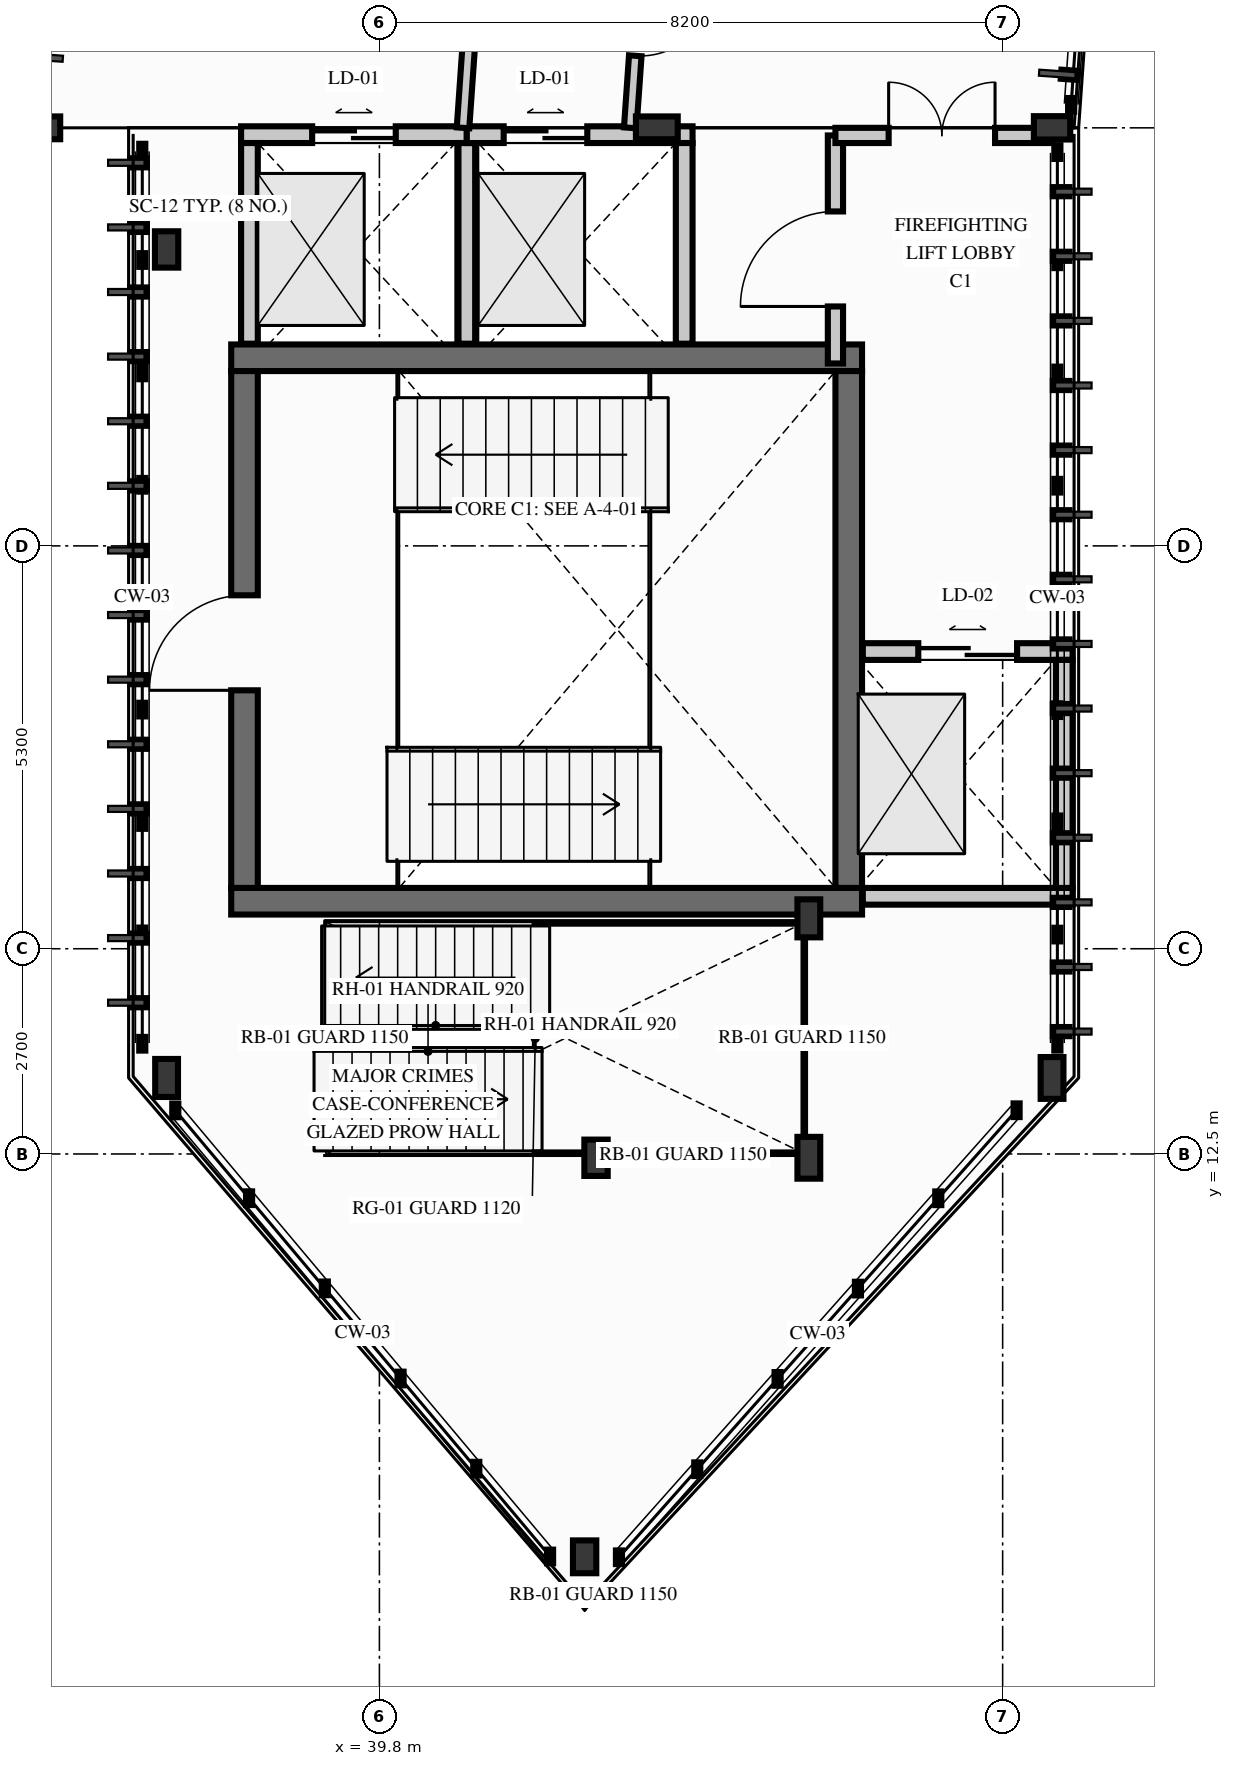
"""IFC4 building model, lengths in metres.
Left out: names, types, materials, properties, quantities, classifications, styles, units other than length and angle.
Written with IfcOpenShell. Run it as: python <this file> out.ifc"""

import sys

from ifc_helpers import new_model, si_unit, direction, frame, frame_2d, origin, origin_2d, place, context, subcontext, project, spatial, rectangle, i_section, extrude, element, fill, save


model = new_model("IFC4")
c1 = context("Model", 3, precision=1e-05, world=origin(), true_north=direction((0.0, 1.0)))
c2 = subcontext(c1, "Body", "Model", "MODEL_VIEW")
j1 = project(units=[si_unit("LENGTHUNIT", "METRE"), si_unit("PLANEANGLEUNIT", "RADIAN")], contexts=[c1])
p1 = place(None, origin())
s1 = spatial("IfcSite", under=j1, at=p1, CompositionType="ELEMENT")
p2 = place(p1, origin())
s2 = spatial("IfcBuilding", under=s1, at=p2, CompositionType="ELEMENT")
p3 = place(p2, frame((0.0, 0.0, 9.3)))
s3 = spatial("IfcBuildingStorey", under=s2, at=p3, CompositionType="ELEMENT", Elevation=9.3)
for number, where, z_axis, x_axis in (
    (1, (37.85, 15.825, 0.0), (0.0, 0.0, 1.0), (1.0, 0.0, 0.0)),
    (2, (37.85, 22.975, 0.0), (0.0, 0.0, 1.0), (1.0, 0.0, 0.0)),
):
    element("IfcWall", number, at=place(p3, frame(where, z_axis=z_axis, x_axis=x_axis)), inside=s3, PredefinedType="SHEAR", context=c2, shape_type="SweptSolid", body=[
        extrude(rectangle(XDim=8.3, YDim=0.35, at=frame_2d((4.15, 0.0))), origin(), (0.0, 0.0, 1.0), 4.0),
    ])
p4 = place(p3, frame((38.025, 16.0, 0.0), z_axis=(0.0, 0.0, 1.0), x_axis=(0.0, 1.0, 0.0)))
e3 = element("IfcWall", 3, at=p4, inside=s3, PredefinedType="SHEAR", context=c2, shape_type="SweptSolid", body=[
    extrude(rectangle(XDim=6.8, YDim=0.35, at=frame_2d((3.4, 0.0))), origin(), (0.0, 0.0, 1.0), 4.0),
])
p5 = place(p4, frame((2.6, 0.0, 0.0)))
e4 = element("IfcOpeningElement", 4, at=p5, cuts=e3, PredefinedType="OPENING", context=c2, shape_type="SweptSolid", body=[
    extrude(rectangle(XDim=1.25, YDim=2.2, at=frame_2d((0.625, 1.1))), frame((0.0, 0.185, 0.0), z_axis=(0.0, -1.0, 0.0), x_axis=(1.0, 0.0, 0.0)), (0.0, 0.0, 1.0), 0.37),
])
p6 = place(p3, frame((45.975, 16.0, 0.0), z_axis=(0.0, 0.0, 1.0), x_axis=(0.0, 1.0, 0.0)))
e5 = element("IfcWall", 5, at=p6, inside=s3, PredefinedType="SHEAR", context=c2, shape_type="SweptSolid", body=[
    extrude(rectangle(XDim=6.8, YDim=0.35, at=frame_2d((3.4, 0.0))), origin(), (0.0, 0.0, 1.0), 4.0),
])
p7 = place(p3, frame((48.65, 26.0, 0.0), z_axis=(0.0, 0.0, 1.0), x_axis=(0.0, 1.0, 0.0)))
e6 = element("IfcColumn", 6, at=p7, inside=s3, PredefinedType="COLUMN", context=c2, shape_type="SweptSolid", body=[
    extrude(i_section(OverallWidth=0.307, OverallDepth=0.478, WebThickness=0.021, FlangeThickness=0.04, FilletRadius=0.027, at=origin_2d()), origin(), (0.0, 0.0, 1.0), 4.2),
])
p8 = place(p3, frame((43.45, 26.0, 0.0), z_axis=(0.0, 0.0, 1.0), x_axis=(0.0, 1.0, 0.0)))
e7 = element("IfcColumn", 7, at=p8, inside=s3, PredefinedType="COLUMN", context=c2, shape_type="SweptSolid", body=[
    extrude(i_section(OverallWidth=0.3, OverallDepth=0.55, WebThickness=0.015, FlangeThickness=0.029, FilletRadius=0.027, at=origin_2d()), origin(), (0.0, 0.0, 1.0), 4.2),
])
p9 = place(p3, frame((35.35, 26.0, 0.0), z_axis=(0.0, 0.0, 1.0), x_axis=(0.0, 1.0, 0.0)))
e8 = element("IfcColumn", 8, at=p9, inside=s3, PredefinedType="COLUMN", context=c2, shape_type="SweptSolid", body=[
    extrude(i_section(OverallWidth=0.3, OverallDepth=0.5, WebThickness=0.014, FlangeThickness=0.028, FilletRadius=0.027, at=origin_2d()), origin(), (0.0, 0.0, 1.0), 4.2),
])
p10 = place(p3, frame((37.0, 24.4, 0.0), z_axis=(0.0, 0.0, 1.0), x_axis=(1.0, 0.0, 0.0)))
e9 = element("IfcColumn", 9, at=p10, inside=s3, PredefinedType="COLUMN", context=c2, shape_type="SweptSolid", body=[
    extrude(i_section(OverallWidth=0.307, OverallDepth=0.478, WebThickness=0.021, FlangeThickness=0.04, FilletRadius=0.027, at=origin_2d()), origin(), (0.0, 0.0, 1.0), 4.2),
])
p11 = place(p3, frame((48.65, 13.5, 0.0), z_axis=(0.0, 0.0, 1.0), x_axis=(1.0, 0.0, 0.0)))
e10 = element("IfcColumn", 10, at=p11, inside=s3, PredefinedType="COLUMN", context=c2, shape_type="SweptSolid", body=[
    extrude(i_section(OverallWidth=0.3, OverallDepth=0.55, WebThickness=0.015, FlangeThickness=0.029, FilletRadius=0.027, at=origin_2d()), origin(), (0.0, 0.0, 1.0), 4.2),
])
p12 = place(p3, frame((37.0, 13.5, 0.0), z_axis=(0.0, 0.0, 1.0), x_axis=(1.0, 0.0, 0.0)))
e11 = element("IfcColumn", 11, at=p12, inside=s3, PredefinedType="COLUMN", context=c2, shape_type="SweptSolid", body=[
    extrude(i_section(OverallWidth=0.3, OverallDepth=0.5, WebThickness=0.014, FlangeThickness=0.028, FilletRadius=0.027, at=origin_2d()), origin(), (0.0, 0.0, 1.0), 4.2),
])
p13 = place(p3, frame((42.5, 7.2, 0.0), z_axis=(0.0, 0.0, 1.0), x_axis=(1.0, 0.0, 0.0)))
e12 = element("IfcColumn", 12, at=p13, inside=s3, PredefinedType="COLUMN", context=c2, shape_type="SweptSolid", body=[
    extrude(i_section(OverallWidth=0.307, OverallDepth=0.432, WebThickness=0.021, FlangeThickness=0.04, FilletRadius=0.027, at=origin_2d()), origin(), (0.0, 0.0, 1.0), 4.2),
])
p14 = place(p3, frame((42.65, 12.45, 0.0), z_axis=(0.0, 0.0, 1.0), x_axis=(1.0, 0.0, 0.0)))
e13 = element("IfcColumn", 13, at=p14, inside=s3, PredefinedType="COLUMN", context=c2, shape_type="SweptSolid", body=[
    extrude(i_section(OverallWidth=0.307, OverallDepth=0.478, WebThickness=0.021, FlangeThickness=0.04, FilletRadius=0.027, at=origin_2d()), origin(), (0.0, 0.0, 1.0), 4.2),
])
p15 = place(p3, frame((45.45, 12.45, 0.0), z_axis=(0.0, 0.0, 1.0), x_axis=(1.0, 0.0, 0.0)))
e14 = element("IfcColumn", 14, at=p15, inside=s3, PredefinedType="COLUMN", context=c2, shape_type="SweptSolid", body=[
    extrude(i_section(OverallWidth=0.3, OverallDepth=0.55, WebThickness=0.015, FlangeThickness=0.029, FilletRadius=0.027, at=origin_2d()), origin(), (0.0, 0.0, 1.0), 4.2),
])
p16 = place(p3, frame((45.45, 15.6, 0.0), z_axis=(0.0, 0.0, 1.0), x_axis=(1.0, 0.0, 0.0)))
e15 = element("IfcColumn", 15, at=p16, inside=s3, PredefinedType="COLUMN", context=c2, shape_type="SweptSolid", body=[
    extrude(i_section(OverallWidth=0.3, OverallDepth=0.5, WebThickness=0.014, FlangeThickness=0.028, FilletRadius=0.027, at=origin_2d()), origin(), (0.0, 0.0, 1.0), 4.2),
])
p17 = place(p3, frame((46.16, 15.89, 0.0), z_axis=(0.0, 0.0, 1.0), x_axis=(1.0, 0.0, 0.0)))
e16 = element("IfcWall", 16, at=p17, inside=s3, PredefinedType="PARTITIONING", context=c2, shape_type="SweptSolid", body=[
    extrude(rectangle(XDim=2.76, YDim=0.22, at=frame_2d((1.38, 0.0))), origin(), (0.0, 0.0, 1.0), 3.638),
])
p18 = place(p3, frame((46.16, 19.11, 0.0), z_axis=(0.0, 0.0, 1.0), x_axis=(1.0, 0.0, 0.0)))
e17 = element("IfcWall", 17, at=p18, inside=s3, PredefinedType="PARTITIONING", context=c2, shape_type="SweptSolid", body=[
    extrude(rectangle(XDim=2.76, YDim=0.22, at=frame_2d((1.38, 0.0))), origin(), (0.0, 0.0, 1.0), 3.638),
])
p19 = place(p18, frame((0.73, 0.0, 0.0)))
e18 = element("IfcOpeningElement", 18, at=p19, cuts=e17, PredefinedType="OPENING", context=c2, shape_type="SweptSolid", body=[
    extrude(rectangle(XDim=1.3, YDim=2.2, at=frame_2d((0.65, 1.1))), frame((0.0, 0.12, 0.0), z_axis=(0.0, -1.0, 0.0), x_axis=(1.0, 0.0, 0.0)), (0.0, 0.0, 1.0), 0.24),
])
p20 = place(p3, frame((48.81, 16.0, 0.0), z_axis=(0.0, 0.0, 1.0), x_axis=(0.0, 1.0, 0.0)))
e19 = element("IfcWall", 19, at=p20, inside=s3, PredefinedType="PARTITIONING", context=c2, shape_type="SweptSolid", body=[
    extrude(rectangle(XDim=3.0, YDim=0.22, at=frame_2d((1.5, 0.0))), origin(), (0.0, 0.0, 1.0), 3.64),
])
p21 = place(p3, frame((37.98, 25.91, 0.0), z_axis=(0.0, 0.0, 1.0), x_axis=(1.0, 0.0, 0.0)))
e20 = element("IfcWall", 20, at=p21, inside=s3, PredefinedType="PARTITIONING", context=c2, shape_type="SweptSolid", body=[
    extrude(rectangle(XDim=2.97, YDim=0.22, at=frame_2d((1.485, 0.0))), origin(), (0.0, 0.0, 1.0), 3.55),
])
p22 = place(p21, frame((0.935, 0.0, 0.0)))
e21 = element("IfcOpeningElement", 21, at=p22, cuts=e20, PredefinedType="OPENING", context=c2, shape_type="SweptSolid", body=[
    extrude(rectangle(XDim=1.1, YDim=2.15, at=frame_2d((0.55, 1.075))), frame((0.0, 0.12, 0.0), z_axis=(0.0, -1.0, 0.0), x_axis=(1.0, 0.0, 0.0)), (0.0, 0.0, 1.0), 0.24),
])
for number, where, z_axis, x_axis in (
    (22, (38.09, 23.16, 0.0), (0.0, 0.0, 1.0), (0.0, 1.0, 0.0)),
    (23, (40.95, 23.16, 0.0), (0.0, 0.0, 1.0), (0.0, 1.0, 0.0)),
):
    element("IfcWall", number, at=place(p3, frame(where, z_axis=z_axis, x_axis=x_axis)), inside=s3, PredefinedType="PARTITIONING", context=c2, shape_type="SweptSolid", body=[
        extrude(rectangle(XDim=2.64, YDim=0.22, at=frame_2d((1.32, 0.0))), origin(), (0.0, 0.0, 1.0), 3.92),
    ])
p23 = place(p3, frame((40.95, 25.91, 0.0), z_axis=(0.0, 0.0, 1.0), x_axis=(1.0, 0.0, 0.0)))
e24 = element("IfcWall", 24, at=p23, inside=s3, PredefinedType="PARTITIONING", context=c2, shape_type="SweptSolid", body=[
    extrude(rectangle(XDim=2.97, YDim=0.22, at=frame_2d((1.485, 0.0))), origin(), (0.0, 0.0, 1.0), 3.55),
])
p24 = place(p23, frame((0.485, 0.0, 0.0)))
e25 = element("IfcOpeningElement", 25, at=p24, cuts=e24, PredefinedType="OPENING", context=c2, shape_type="SweptSolid", body=[
    extrude(rectangle(XDim=1.1, YDim=2.15, at=frame_2d((0.55, 1.075))), frame((0.0, 0.12, 0.0), z_axis=(0.0, -1.0, 0.0), x_axis=(1.0, 0.0, 0.0)), (0.0, 0.0, 1.0), 0.24),
])
p25 = place(p3, frame((43.81, 23.16, 0.0), z_axis=(0.0, 0.0, 1.0), x_axis=(0.0, 1.0, 0.0)))
e26 = element("IfcWall", 26, at=p25, inside=s3, PredefinedType="PARTITIONING", context=c2, shape_type="SweptSolid", body=[
    extrude(rectangle(XDim=2.64, YDim=0.22, at=frame_2d((1.32, 0.0))), origin(), (0.0, 0.0, 1.0), 3.92),
])
p26 = place(p3, frame((45.8, 22.9, 0.0), z_axis=(0.0, 0.0, 1.0), x_axis=(0.0, 1.0, 0.0)))
e27 = element("IfcWall", 27, at=p26, inside=s3, PredefinedType="PARTITIONING", context=c2, shape_type="SweptSolid", body=[
    extrude(rectangle(XDim=3.0, YDim=0.2, at=frame_2d((1.5, 0.0))), origin(), (0.0, 0.0, 1.0), 3.92),
])
p27 = place(p26, frame((0.75, 0.0, 0.0)))
e28 = element("IfcOpeningElement", 28, at=p27, cuts=e27, PredefinedType="OPENING", context=c2, shape_type="SweptSolid", body=[
    extrude(rectangle(XDim=1.25, YDim=2.2, at=frame_2d((0.625, 1.1))), frame((0.0, 0.11, 0.0), z_axis=(0.0, -1.0, 0.0), x_axis=(1.0, 0.0, 0.0)), (0.0, 0.0, 1.0), 0.22),
])
p28 = place(p3, frame((45.8, 25.9, 0.0), z_axis=(0.0, 0.0, 1.0), x_axis=(1.0, 0.0, 0.0)))
e29 = element("IfcWall", 29, at=p28, inside=s3, PredefinedType="PARTITIONING", context=c2, shape_type="SweptSolid", body=[
    extrude(rectangle(XDim=2.85, YDim=0.2, at=frame_2d((1.425, 0.0))), origin(), (0.0, 0.0, 1.0), 3.6),
])
p29 = place(p28, frame((0.7, 0.0, 0.0)))
e30 = element("IfcOpeningElement", 30, at=p29, cuts=e29, PredefinedType="OPENING", context=c2, shape_type="SweptSolid", body=[
    extrude(rectangle(XDim=1.4, YDim=2.25, at=frame_2d((0.7, 1.125))), frame((0.0, 0.11, 0.0), z_axis=(0.0, -1.0, 0.0), x_axis=(1.0, 0.0, 0.0)), (0.0, 0.0, 1.0), 0.22),
])
p30 = place(p3, frame((43.595, 33.084, 0.0), z_axis=(0.0, 0.0, 1.0), x_axis=(-0.069756597752, -0.997564041588, 0.0)))
e31 = element("IfcWall", 31, at=p30, inside=s3, PredefinedType="PARTITIONING", context=c2, shape_type="SweptSolid", body=[
    extrude(rectangle(XDim=7.101, YDim=0.165, at=frame_2d((3.551, 0.0))), origin(), (0.0, 0.0, 1.0), 3.92),
])
p31 = place(p30, frame((5.201, 0.0, 0.0)))
e32 = element("IfcOpeningElement", 32, at=p31, cuts=e31, PredefinedType="OPENING", context=c2, shape_type="SweptSolid", body=[
    extrude(rectangle(XDim=0.95, YDim=2.15, at=frame_2d((0.475, 1.075))), frame((0.0, 0.093, 0.0), z_axis=(0.0, -1.0, 0.0), x_axis=(1.0, 0.0, 0.0)), (0.0, 0.0, 1.0), 0.185),
])
p32 = place(p30, frame((1.2, 0.0, 0.0)))
e33 = element("IfcOpeningElement", 33, at=p32, cuts=e31, PredefinedType="OPENING", context=c2, shape_type="SweptSolid", body=[
    extrude(rectangle(XDim=0.98, YDim=2.16, at=frame_2d((0.49, 1.08))), frame((0.0, 0.093, 0.0), z_axis=(0.0, -1.0, 0.0), x_axis=(1.0, 0.0, 0.0)), (0.0, 0.0, 1.0), 0.185),
])
p33 = place(p3, frame((41.417, 33.39, 0.0), z_axis=(0.0, 0.0, 1.0), x_axis=(-0.069766817412, -0.997563326906, 0.0)))
e34 = element("IfcWall", 34, at=p33, inside=s3, PredefinedType="PARTITIONING", context=c2, shape_type="SweptSolid", body=[
    extrude(rectangle(XDim=7.408, YDim=0.165, at=frame_2d((3.704, 0.0))), origin(), (0.0, 0.0, 1.0), 3.92),
])
p34 = place(p33, frame((3.111, 0.0, 0.0)))
e35 = element("IfcOpeningElement", 35, at=p34, cuts=e34, PredefinedType="OPENING", context=c2, shape_type="SweptSolid", body=[
    extrude(rectangle(XDim=1.76, YDim=2.36, at=frame_2d((0.88, 1.18))), frame((0.0, 0.093, 0.0), z_axis=(0.0, -1.0, 0.0), x_axis=(1.0, 0.0, 0.0)), (0.0, 0.0, 1.0), 0.185),
])
p35 = place(p5, origin())
e36 = element("IfcDoor", 36, at=p35, inside=s3, OperationType="SINGLE_SWING_LEFT", PredefinedType="DOOR", context=c2, shape_type="SweptSolid", body=[
    extrude(rectangle(XDim=1.25, YDim=2.2, at=frame_2d((0.625, 1.1))), frame((0.0, 0.025, 0.0), z_axis=(0.0, -1.0, 0.0), x_axis=(1.0, 0.0, 0.0)), (0.0, 0.0, 1.0), 0.05),
])
fill(e4, e36)
p36 = place(p19, origin())
e37 = element("IfcDoor", 37, at=p36, inside=s3, OperationType="DOUBLE_DOOR_SLIDING", PredefinedType="DOOR", context=c2, shape_type="SweptSolid", body=[
    extrude(rectangle(XDim=1.3, YDim=2.2, at=frame_2d((0.65, 1.1))), frame((0.0, 0.025, 0.0), z_axis=(0.0, -1.0, 0.0), x_axis=(1.0, 0.0, 0.0)), (0.0, 0.0, 1.0), 0.05),
])
fill(e18, e37)
p37 = place(p22, origin())
e38 = element("IfcDoor", 38, at=p37, inside=s3, OperationType="DOUBLE_DOOR_SLIDING", PredefinedType="DOOR", context=c2, shape_type="SweptSolid", body=[
    extrude(rectangle(XDim=1.1, YDim=2.15, at=frame_2d((0.55, 1.075))), frame((0.0, 0.025, 0.0), z_axis=(0.0, -1.0, 0.0), x_axis=(1.0, 0.0, 0.0)), (0.0, 0.0, 1.0), 0.05),
])
fill(e21, e38)
p38 = place(p24, origin())
e39 = element("IfcDoor", 39, at=p38, inside=s3, OperationType="DOUBLE_DOOR_SLIDING", PredefinedType="DOOR", context=c2, shape_type="SweptSolid", body=[
    extrude(rectangle(XDim=1.1, YDim=2.15, at=frame_2d((0.55, 1.075))), frame((0.0, 0.025, 0.0), z_axis=(0.0, -1.0, 0.0), x_axis=(1.0, 0.0, 0.0)), (0.0, 0.0, 1.0), 0.05),
])
fill(e25, e39)
p39 = place(p29, origin())
e40 = element("IfcDoor", 40, at=p39, inside=s3, OperationType="DOUBLE_DOOR_SINGLE_SWING", PredefinedType="DOOR", context=c2, shape_type="SweptSolid", body=[
    extrude(rectangle(XDim=1.4, YDim=2.25, at=frame_2d((0.7, 1.125))), frame((0.0, 0.025, 0.0), z_axis=(0.0, -1.0, 0.0), x_axis=(1.0, 0.0, 0.0)), (0.0, 0.0, 1.0), 0.05),
])
fill(e30, e40)
p40 = place(p27, origin())
e41 = element("IfcDoor", 41, at=p40, inside=s3, OperationType="SINGLE_SWING_LEFT", PredefinedType="DOOR", context=c2, shape_type="SweptSolid", body=[
    extrude(rectangle(XDim=1.25, YDim=2.2, at=frame_2d((0.625, 1.1))), frame((0.0, 0.025, 0.0), z_axis=(0.0, -1.0, 0.0), x_axis=(1.0, 0.0, 0.0)), (0.0, 0.0, 1.0), 0.05),
])
fill(e28, e41)
p41 = place(p31, origin())
e42 = element("IfcDoor", 42, at=p41, inside=s3, OperationType="SINGLE_SWING_LEFT", PredefinedType="DOOR", context=c2, shape_type="SweptSolid", body=[
    extrude(rectangle(XDim=0.95, YDim=2.15, at=frame_2d((0.475, 1.075))), frame((0.0, 0.025, 0.0), z_axis=(0.0, -1.0, 0.0), x_axis=(1.0, 0.0, 0.0)), (0.0, 0.0, 1.0), 0.05),
])
fill(e32, e42)
save(model, sys.argv[1])
